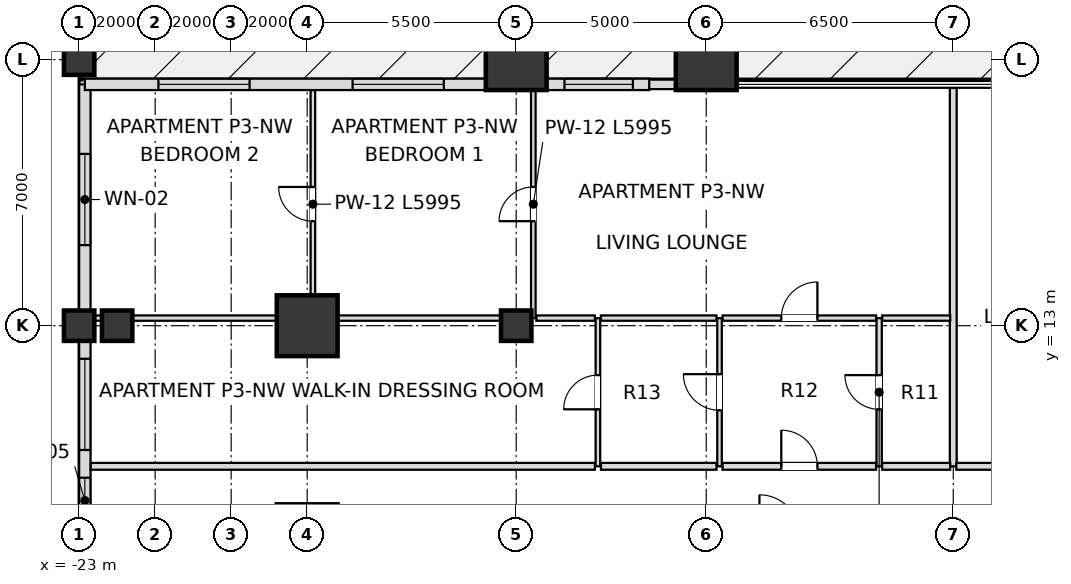
"""IFC4 building model, lengths in metres.
Left out: names, types, materials, properties, quantities, classifications, styles, units other than length and angle.
Written with IfcOpenShell. Run it as: python <this file> out.ifc"""

import sys

from ifc_helpers import new_model, si_unit, direction, frame, frame_2d, origin, origin_2d, place, context, subcontext, project, spatial, rectangle, extrude, element, fill, save


model = new_model("IFC4")
c1 = context("Model", 3, precision=1e-05, world=origin(), true_north=direction((0.0, 1.0)))
c2 = subcontext(c1, "Body", "Model", "MODEL_VIEW")
j1 = project(units=[si_unit("LENGTHUNIT", "METRE"), si_unit("PLANEANGLEUNIT", "RADIAN")], contexts=[c1])
p1 = place(None, origin())
s1 = spatial("IfcSite", under=j1, at=p1, CompositionType="ELEMENT")
p2 = place(p1, origin())
s2 = spatial("IfcBuilding", under=s1, at=p2, CompositionType="ELEMENT")
p3 = place(p2, frame((0.0, 0.0, 16.8)))
s3 = spatial("IfcBuildingStorey", under=s2, at=p3, CompositionType="ELEMENT", Elevation=16.8)
for number, where, z_axis, x_axis in (
    (1, (-6.5, 20.0, 0.0), (0.0, 0.0, 1.0), (1.0, 0.0, 0.0)),
    (2, (-11.5, 20.0, 0.0), (0.0, 0.0, 1.0), (1.0, 0.0, 0.0)),
    (3, (-17.0, 13.0, 0.0), (0.0, 0.0, 1.0), (1.0, 0.0, 0.0)),
):
    element("IfcColumn", number, at=place(p3, frame(where, z_axis=z_axis, x_axis=x_axis)), inside=s3, PredefinedType="USERDEFINED", context=c2, shape_type="SweptSolid", body=[
        extrude(rectangle(XDim=1.6, YDim=1.6, at=origin_2d()), origin(), (0.0, 0.0, 1.0), 5.4),
    ])
for number, where, z_axis, x_axis in (
    (4, (-23.0, 13.0, 0.0), (0.0, 0.0, 1.0), (1.0, 0.0, 0.0)),
    (5, (-23.0, 20.0, 0.0), (0.0, 0.0, 1.0), (1.0, 0.0, 0.0)),
    (6, (-11.5, 13.0, 0.0), (0.0, 0.0, 1.0), (1.0, 0.0, 0.0)),
    (7, (-22.0, 13.0, 0.0), (0.0, 0.0, 1.0), (1.0, 0.0, 0.0)),
):
    element("IfcColumn", number, at=place(p3, frame(where, z_axis=z_axis, x_axis=x_axis)), inside=s3, PredefinedType="COLUMN", context=c2, shape_type="SweptSolid", body=[
        extrude(rectangle(XDim=0.8, YDim=0.8, at=origin_2d()), origin(), (0.0, 0.0, 1.0), 5.4),
    ])
p4 = place(p3, frame((-22.85, 19.35, 0.0), z_axis=(0.0, 0.0, 1.0), x_axis=(0.0, -1.0, 0.0)))
e8 = element("IfcWall", 8, at=p4, inside=s3, PredefinedType="SOLIDWALL", context=c2, shape_type="SweptSolid", body=[
    extrude(rectangle(XDim=38.7, YDim=0.3, at=frame_2d((19.35, 0.0))), origin(), (0.0, 0.0, 1.0), 4.476),
])
p5 = place(p4, frame((1.83, 0.0, 0.8)))
e9 = element("IfcOpeningElement", 9, at=p5, cuts=e8, PredefinedType="OPENING", context=c2, shape_type="SweptSolid", body=[
    extrude(rectangle(XDim=2.4, YDim=2.2, at=frame_2d((1.2, 1.1))), frame((0.0, 0.16, 0.0), z_axis=(0.0, -1.0, 0.0), x_axis=(1.0, 0.0, 0.0)), (0.0, 0.0, 1.0), 0.32),
])
p6 = place(p4, frame((7.22, 0.0, 0.8)))
e10 = element("IfcOpeningElement", 10, at=p6, cuts=e8, PredefinedType="OPENING", context=c2, shape_type="SweptSolid", body=[
    extrude(rectangle(XDim=2.4, YDim=2.2, at=frame_2d((1.2, 1.1))), frame((0.0, 0.16, 0.0), z_axis=(0.0, -1.0, 0.0), x_axis=(1.0, 0.0, 0.0)), (0.0, 0.0, 1.0), 0.32),
])
p7 = place(p4, frame((10.35, 0.0, 0.72)))
e11 = element("IfcOpeningElement", 11, at=p7, cuts=e8, PredefinedType="OPENING", context=c2, shape_type="SweptSolid", body=[
    extrude(rectangle(XDim=1.2, YDim=1.68, at=frame_2d((0.6, 0.84))), frame((0.0, 0.16, 0.0), z_axis=(0.0, -1.0, 0.0), x_axis=(1.0, 0.0, 0.0)), (0.0, 0.0, 1.0), 0.32),
])
p8 = place(p4, frame((12.495, 0.0, 0.8)))
e12 = element("IfcOpeningElement", 12, at=p8, cuts=e8, PredefinedType="OPENING", context=c2, shape_type="SweptSolid", body=[
    extrude(rectangle(XDim=2.4, YDim=2.2, at=frame_2d((1.2, 1.1))), frame((0.0, 0.16, 0.0), z_axis=(0.0, -1.0, 0.0), x_axis=(1.0, 0.0, 0.0)), (0.0, 0.0, 1.0), 0.32),
])
p9 = place(p4, frame((15.865, 0.0, 0.8)))
e13 = element("IfcOpeningElement", 13, at=p9, cuts=e8, PredefinedType="OPENING", context=c2, shape_type="SweptSolid", body=[
    extrude(rectangle(XDim=2.4, YDim=2.2, at=frame_2d((1.2, 1.1))), frame((0.0, 0.16, 0.0), z_axis=(0.0, -1.0, 0.0), x_axis=(1.0, 0.0, 0.0)), (0.0, 0.0, 1.0), 0.32),
])
p10 = place(p4, frame((20.435, 0.0, 0.8)))
e14 = element("IfcOpeningElement", 14, at=p10, cuts=e8, PredefinedType="OPENING", context=c2, shape_type="SweptSolid", body=[
    extrude(rectangle(XDim=2.4, YDim=2.2, at=frame_2d((1.2, 1.1))), frame((0.0, 0.16, 0.0), z_axis=(0.0, -1.0, 0.0), x_axis=(1.0, 0.0, 0.0)), (0.0, 0.0, 1.0), 0.32),
])
p11 = place(p4, frame((23.805, 0.0, 0.8)))
e15 = element("IfcOpeningElement", 15, at=p11, cuts=e8, PredefinedType="OPENING", context=c2, shape_type="SweptSolid", body=[
    extrude(rectangle(XDim=2.4, YDim=2.2, at=frame_2d((1.2, 1.1))), frame((0.0, 0.16, 0.0), z_axis=(0.0, -1.0, 0.0), x_axis=(1.0, 0.0, 0.0)), (0.0, 0.0, 1.0), 0.32),
])
p12 = place(p4, frame((27.15, 0.0, 0.72)))
e16 = element("IfcOpeningElement", 16, at=p12, cuts=e8, PredefinedType="OPENING", context=c2, shape_type="SweptSolid", body=[
    extrude(rectangle(XDim=1.2, YDim=1.68, at=frame_2d((0.6, 0.84))), frame((0.0, 0.16, 0.0), z_axis=(0.0, -1.0, 0.0), x_axis=(1.0, 0.0, 0.0)), (0.0, 0.0, 1.0), 0.32),
])
p13 = place(p4, frame((29.08, 0.0, 0.8)))
e17 = element("IfcOpeningElement", 17, at=p13, cuts=e8, PredefinedType="OPENING", context=c2, shape_type="SweptSolid", body=[
    extrude(rectangle(XDim=2.4, YDim=2.2, at=frame_2d((1.2, 1.1))), frame((0.0, 0.16, 0.0), z_axis=(0.0, -1.0, 0.0), x_axis=(1.0, 0.0, 0.0)), (0.0, 0.0, 1.0), 0.32),
])
p14 = place(p4, frame((34.47, 0.0, 0.8)))
e18 = element("IfcOpeningElement", 18, at=p14, cuts=e8, PredefinedType="OPENING", context=c2, shape_type="SweptSolid", body=[
    extrude(rectangle(XDim=2.4, YDim=2.2, at=frame_2d((1.2, 1.1))), frame((0.0, 0.16, 0.0), z_axis=(0.0, -1.0, 0.0), x_axis=(1.0, 0.0, 0.0)), (0.0, 0.0, 1.0), 0.32),
])
p15 = place(p3, frame((-7.295, 19.35, 0.0), z_axis=(0.0, 0.0, 1.0), x_axis=(-1.0, 0.0, 0.0)))
e19 = element("IfcWall", 19, at=p15, inside=s3, PredefinedType="SOLIDWALL", context=c2, shape_type="SweptSolid", body=[
    extrude(rectangle(XDim=0.73, YDim=0.25, at=frame_2d((0.365, 0.0))), origin(), (0.0, 0.0, 1.0), 5.12),
])
p16 = place(p3, frame((-22.85, 19.35, 0.0), z_axis=(0.0, 0.0, 1.0), x_axis=(1.0, 0.0, 0.0)))
e20 = element("IfcWall", 20, at=p16, inside=s3, PredefinedType="SOLIDWALL", context=c2, shape_type="SweptSolid", body=[
    extrude(rectangle(XDim=14.85, YDim=0.3, at=frame_2d((7.425, 0.0))), origin(), (0.0, 0.0, 1.0), 5.12),
])
p17 = place(p16, frame((1.935, 0.0, 0.8)))
e21 = element("IfcOpeningElement", 21, at=p17, cuts=e20, PredefinedType="OPENING", context=c2, shape_type="SweptSolid", body=[
    extrude(rectangle(XDim=2.4, YDim=2.2, at=frame_2d((1.2, 1.1))), frame((0.0, 0.16, 0.0), z_axis=(0.0, -1.0, 0.0), x_axis=(1.0, 0.0, 0.0)), (0.0, 0.0, 1.0), 0.32),
])
p18 = place(p16, frame((7.045, 0.0, 0.8)))
e22 = element("IfcOpeningElement", 22, at=p18, cuts=e20, PredefinedType="OPENING", context=c2, shape_type="SweptSolid", body=[
    extrude(rectangle(XDim=2.4, YDim=2.2, at=frame_2d((1.2, 1.1))), frame((0.0, 0.16, 0.0), z_axis=(0.0, -1.0, 0.0), x_axis=(1.0, 0.0, 0.0)), (0.0, 0.0, 1.0), 0.32),
])
p19 = place(p16, frame((12.62, 0.0, 0.72)))
e23 = element("IfcOpeningElement", 23, at=p19, cuts=e20, PredefinedType="OPENING", context=c2, shape_type="SweptSolid", body=[
    extrude(rectangle(XDim=1.8, YDim=1.68, at=frame_2d((0.9, 0.84))), frame((0.0, 0.16, 0.0), z_axis=(0.0, -1.0, 0.0), x_axis=(1.0, 0.0, 0.0)), (0.0, 0.0, 1.0), 0.32),
])
p20 = place(p3, frame((-16.85, 13.2, 0.0), z_axis=(0.0, 0.0, 1.0), x_axis=(0.0, 1.0, 0.0)))
e24 = element("IfcWall", 24, at=p20, inside=s3, PredefinedType="PARTITIONING", context=c2, shape_type="SweptSolid", body=[
    extrude(rectangle(XDim=5.995, YDim=0.12, at=frame_2d((2.998, 0.0))), origin(), (0.0, 0.0, 1.0), 5.12),
])
p21 = place(p20, frame((2.55, 0.0, 0.0)))
e25 = element("IfcOpeningElement", 25, at=p21, cuts=e24, PredefinedType="OPENING", context=c2, shape_type="SweptSolid", body=[
    extrude(rectangle(XDim=0.9, YDim=2.1, at=frame_2d((0.45, 1.05))), frame((0.0, 0.07, 0.0), z_axis=(0.0, -1.0, 0.0), x_axis=(1.0, 0.0, 0.0)), (0.0, 0.0, 1.0), 0.14),
])
p22 = place(p3, frame((-11.05, 13.2, 0.0), z_axis=(0.0, 0.0, 1.0), x_axis=(0.0, 1.0, 0.0)))
e26 = element("IfcWall", 26, at=p22, inside=s3, PredefinedType="PARTITIONING", context=c2, shape_type="SweptSolid", body=[
    extrude(rectangle(XDim=5.995, YDim=0.12, at=frame_2d((2.998, 0.0))), origin(), (0.0, 0.0, 1.0), 5.12),
])
p23 = place(p22, frame((2.55, 0.0, 0.0)))
e27 = element("IfcOpeningElement", 27, at=p23, cuts=e26, PredefinedType="OPENING", context=c2, shape_type="SweptSolid", body=[
    extrude(rectangle(XDim=0.9, YDim=2.1, at=frame_2d((0.45, 1.05))), frame((0.0, 0.07, 0.0), z_axis=(0.0, -1.0, 0.0), x_axis=(1.0, 0.0, 0.0)), (0.0, 0.0, 1.0), 0.14),
])
p24 = place(p3, frame((-9.35, 9.3, 0.0), z_axis=(0.0, 0.0, 1.0), x_axis=(0.0, 1.0, 0.0)))
e28 = element("IfcWall", 28, at=p24, inside=s3, PredefinedType="PARTITIONING", context=c2, shape_type="SweptSolid", body=[
    extrude(rectangle(XDim=3.9, YDim=0.12, at=frame_2d((1.95, 0.0))), origin(), (0.0, 0.0, 1.0), 4.41),
])
p25 = place(p24, frame((1.5, 0.0, 0.0)))
e29 = element("IfcOpeningElement", 29, at=p25, cuts=e28, PredefinedType="OPENING", context=c2, shape_type="SweptSolid", body=[
    extrude(rectangle(XDim=0.9, YDim=2.1, at=frame_2d((0.45, 1.05))), frame((0.0, 0.07, 0.0), z_axis=(0.0, -1.0, 0.0), x_axis=(1.0, 0.0, 0.0)), (0.0, 0.0, 1.0), 0.14),
])
p26 = place(p3, frame((-6.15, 9.3, 0.0), z_axis=(0.0, 0.0, 1.0), x_axis=(0.0, 1.0, 0.0)))
e30 = element("IfcWall", 30, at=p26, inside=s3, PredefinedType="PARTITIONING", context=c2, shape_type="SweptSolid", body=[
    extrude(rectangle(XDim=3.9, YDim=0.12, at=frame_2d((1.95, 0.0))), origin(), (0.0, 0.0, 1.0), 5.12),
])
p27 = place(p26, frame((1.475, 0.0, 0.0)))
e31 = element("IfcOpeningElement", 31, at=p27, cuts=e30, PredefinedType="OPENING", context=c2, shape_type="SweptSolid", body=[
    extrude(rectangle(XDim=0.95, YDim=2.1, at=frame_2d((0.475, 1.05))), frame((0.0, 0.07, 0.0), z_axis=(0.0, -1.0, 0.0), x_axis=(1.0, 0.0, 0.0)), (0.0, 0.0, 1.0), 0.14),
])
p28 = place(p3, frame((-1.95, 9.3, 0.0), z_axis=(0.0, 0.0, 1.0), x_axis=(0.0, 1.0, 0.0)))
e32 = element("IfcWall", 32, at=p28, inside=s3, PredefinedType="PARTITIONING", context=c2, shape_type="SweptSolid", body=[
    extrude(rectangle(XDim=3.9, YDim=0.14, at=frame_2d((1.95, 0.0))), origin(), (0.0, 0.0, 1.0), 5.12),
])
p29 = place(p28, frame((1.5, 0.0, 0.0)))
e33 = element("IfcOpeningElement", 33, at=p29, cuts=e32, PredefinedType="OPENING", context=c2, shape_type="SweptSolid", body=[
    extrude(rectangle(XDim=0.9, YDim=2.1, at=frame_2d((0.45, 1.05))), frame((0.0, 0.08, 0.0), z_axis=(0.0, -1.0, 0.0), x_axis=(1.0, 0.0, 0.0)), (0.0, 0.0, 1.0), 0.16),
])
p30 = place(p3, frame((0.0, 9.3, 0.0), z_axis=(0.0, 0.0, 1.0), x_axis=(0.0, 1.0, 0.0)))
e34 = element("IfcWall", 34, at=p30, inside=s3, PredefinedType="PARTITIONING", context=c2, shape_type="SweptSolid", body=[
    extrude(rectangle(XDim=9.955, YDim=0.18, at=frame_2d((4.978, 0.0))), origin(), (0.0, 0.0, 1.0), 4.642),
])
p31 = place(p3, frame((-22.695, 9.3, 0.0), z_axis=(0.0, 0.0, 1.0), x_axis=(1.0, 0.0, 0.0)))
e35 = element("IfcWall", 35, at=p31, inside=s3, PredefinedType="PARTITIONING", context=c2, shape_type="SweptSolid", body=[
    extrude(rectangle(XDim=13.265, YDim=0.18, at=frame_2d((6.633, 0.0))), origin(), (0.0, 0.0, 1.0), 4.41),
])
p32 = place(p3, frame((-9.27, 9.3, 0.0), z_axis=(0.0, 0.0, 1.0), x_axis=(1.0, 0.0, 0.0)))
e36 = element("IfcWall", 36, at=p32, inside=s3, PredefinedType="PARTITIONING", context=c2, shape_type="SweptSolid", body=[
    extrude(rectangle(XDim=3.04, YDim=0.18, at=frame_2d((1.52, 0.0))), origin(), (0.0, 0.0, 1.0), 4.41),
])
p33 = place(p3, frame((-6.07, 9.3, 0.0), z_axis=(0.0, 0.0, 1.0), x_axis=(1.0, 0.0, 0.0)))
e37 = element("IfcWall", 37, at=p33, inside=s3, PredefinedType="PARTITIONING", context=c2, shape_type="SweptSolid", body=[
    extrude(rectangle(XDim=4.04, YDim=0.18, at=frame_2d((2.02, 0.0))), origin(), (0.0, 0.0, 1.0), 5.12),
])
p34 = place(p33, frame((1.545, 0.0, 0.0)))
e38 = element("IfcOpeningElement", 38, at=p34, cuts=e37, PredefinedType="OPENING", context=c2, shape_type="SweptSolid", body=[
    extrude(rectangle(XDim=0.95, YDim=2.15, at=frame_2d((0.475, 1.075))), frame((0.0, 0.1, 0.0), z_axis=(0.0, -1.0, 0.0), x_axis=(1.0, 0.0, 0.0)), (0.0, 0.0, 1.0), 0.2),
])
p35 = place(p3, frame((-1.87, 9.3, 0.0), z_axis=(0.0, 0.0, 1.0), x_axis=(1.0, 0.0, 0.0)))
e39 = element("IfcWall", 39, at=p35, inside=s3, PredefinedType="PARTITIONING", context=c2, shape_type="SweptSolid", body=[
    extrude(rectangle(XDim=1.79, YDim=0.18, at=frame_2d((0.895, 0.0))), origin(), (0.0, 0.0, 1.0), 5.12),
])
p36 = place(p3, frame((0.08, 9.3, 0.0), z_axis=(0.0, 0.0, 1.0), x_axis=(1.0, 0.0, 0.0)))
e40 = element("IfcWall", 40, at=p36, inside=s3, PredefinedType="PARTITIONING", context=c2, shape_type="SweptSolid", body=[
    extrude(rectangle(XDim=22.615, YDim=0.18, at=frame_2d((11.308, 0.0))), origin(), (0.0, 0.0, 1.0), 4.41),
])
p37 = place(p36, frame((9.445, 0.0, 0.0)))
e41 = element("IfcOpeningElement", 41, at=p37, cuts=e40, PredefinedType="OPENING", context=c2, shape_type="SweptSolid", body=[
    extrude(rectangle(XDim=0.95, YDim=2.15, at=frame_2d((0.475, 1.075))), frame((0.0, 0.1, 0.0), z_axis=(0.0, -1.0, 0.0), x_axis=(1.0, 0.0, 0.0)), (0.0, 0.0, 1.0), 0.2),
])
p38 = place(p3, frame((-22.695, 13.2, 0.0), z_axis=(0.0, 0.0, 1.0), x_axis=(1.0, 0.0, 0.0)))
e42 = element("IfcWall", 42, at=p38, inside=s3, PredefinedType="PARTITIONING", context=c2, shape_type="SweptSolid", body=[
    extrude(rectangle(XDim=5.765, YDim=0.14, at=frame_2d((2.883, 0.0))), origin(), (0.0, 0.0, 1.0), 4.41),
])
p39 = place(p3, frame((-16.77, 13.2, 0.0), z_axis=(0.0, 0.0, 1.0), x_axis=(1.0, 0.0, 0.0)))
e43 = element("IfcWall", 43, at=p39, inside=s3, PredefinedType="PARTITIONING", context=c2, shape_type="SweptSolid", body=[
    extrude(rectangle(XDim=5.64, YDim=0.14, at=frame_2d((2.82, 0.0))), origin(), (0.0, 0.0, 1.0), 4.41),
])
p40 = place(p3, frame((-10.97, 13.2, 0.0), z_axis=(0.0, 0.0, 1.0), x_axis=(1.0, 0.0, 0.0)))
e44 = element("IfcWall", 44, at=p40, inside=s3, PredefinedType="PARTITIONING", context=c2, shape_type="SweptSolid", body=[
    extrude(rectangle(XDim=1.54, YDim=0.14, at=frame_2d((0.77, 0.0))), origin(), (0.0, 0.0, 1.0), 4.41),
])
p41 = place(p3, frame((-9.27, 13.2, 0.0), z_axis=(0.0, 0.0, 1.0), x_axis=(1.0, 0.0, 0.0)))
e45 = element("IfcWall", 45, at=p41, inside=s3, PredefinedType="PARTITIONING", context=c2, shape_type="SweptSolid", body=[
    extrude(rectangle(XDim=3.04, YDim=0.14, at=frame_2d((1.52, 0.0))), origin(), (0.0, 0.0, 1.0), 4.41),
])
p42 = place(p3, frame((-6.07, 13.2, 0.0), z_axis=(0.0, 0.0, 1.0), x_axis=(1.0, 0.0, 0.0)))
e46 = element("IfcWall", 46, at=p42, inside=s3, PredefinedType="PARTITIONING", context=c2, shape_type="SweptSolid", body=[
    extrude(rectangle(XDim=4.04, YDim=0.14, at=frame_2d((2.02, 0.0))), origin(), (0.0, 0.0, 1.0), 5.12),
])
p43 = place(p42, frame((1.545, 0.0, 0.0)))
e47 = element("IfcOpeningElement", 47, at=p43, cuts=e46, PredefinedType="OPENING", context=c2, shape_type="SweptSolid", body=[
    extrude(rectangle(XDim=0.95, YDim=2.1, at=frame_2d((0.475, 1.05))), frame((0.0, 0.08, 0.0), z_axis=(0.0, -1.0, 0.0), x_axis=(1.0, 0.0, 0.0)), (0.0, 0.0, 1.0), 0.16),
])
p44 = place(p3, frame((-1.87, 13.2, 0.0), z_axis=(0.0, 0.0, 1.0), x_axis=(1.0, 0.0, 0.0)))
e48 = element("IfcWall", 48, at=p44, inside=s3, PredefinedType="PARTITIONING", context=c2, shape_type="SweptSolid", body=[
    extrude(rectangle(XDim=1.79, YDim=0.14, at=frame_2d((0.895, 0.0))), origin(), (0.0, 0.0, 1.0), 5.12),
])
p45 = place(p5, origin())
e49 = element("IfcWindow", 49, at=p45, inside=s3, PartitioningType="SINGLE_PANEL", PredefinedType="WINDOW", context=c2, shape_type="SweptSolid", body=[
    extrude(rectangle(XDim=2.4, YDim=2.2, at=frame_2d((1.2, 1.1))), frame((0.0, 0.03, 0.0), z_axis=(0.0, -1.0, 0.0), x_axis=(1.0, 0.0, 0.0)), (0.0, 0.0, 1.0), 0.06),
])
fill(e9, e49)
p46 = place(p6, origin())
e50 = element("IfcWindow", 50, at=p46, inside=s3, PartitioningType="SINGLE_PANEL", PredefinedType="WINDOW", context=c2, shape_type="SweptSolid", body=[
    extrude(rectangle(XDim=2.4, YDim=2.2, at=frame_2d((1.2, 1.1))), frame((0.0, 0.03, 0.0), z_axis=(0.0, -1.0, 0.0), x_axis=(1.0, 0.0, 0.0)), (0.0, 0.0, 1.0), 0.06),
])
fill(e10, e50)
p47 = place(p7, origin())
e51 = element("IfcWindow", 51, at=p47, inside=s3, PartitioningType="SINGLE_PANEL", PredefinedType="WINDOW", context=c2, shape_type="SweptSolid", body=[
    extrude(rectangle(XDim=1.2, YDim=1.68, at=frame_2d((0.6, 0.84))), frame((0.0, 0.03, 0.0), z_axis=(0.0, -1.0, 0.0), x_axis=(1.0, 0.0, 0.0)), (0.0, 0.0, 1.0), 0.06),
])
fill(e11, e51)
p48 = place(p17, origin())
e52 = element("IfcWindow", 52, at=p48, inside=s3, PartitioningType="SINGLE_PANEL", PredefinedType="WINDOW", context=c2, shape_type="SweptSolid", body=[
    extrude(rectangle(XDim=2.4, YDim=2.2, at=frame_2d((1.2, 1.1))), frame((0.0, 0.03, 0.0), z_axis=(0.0, -1.0, 0.0), x_axis=(1.0, 0.0, 0.0)), (0.0, 0.0, 1.0), 0.06),
])
fill(e21, e52)
p49 = place(p18, origin())
e53 = element("IfcWindow", 53, at=p49, inside=s3, PartitioningType="SINGLE_PANEL", PredefinedType="WINDOW", context=c2, shape_type="SweptSolid", body=[
    extrude(rectangle(XDim=2.4, YDim=2.2, at=frame_2d((1.2, 1.1))), frame((0.0, 0.03, 0.0), z_axis=(0.0, -1.0, 0.0), x_axis=(1.0, 0.0, 0.0)), (0.0, 0.0, 1.0), 0.06),
])
fill(e22, e53)
p50 = place(p19, origin())
e54 = element("IfcWindow", 54, at=p50, inside=s3, PartitioningType="SINGLE_PANEL", PredefinedType="WINDOW", context=c2, shape_type="SweptSolid", body=[
    extrude(rectangle(XDim=1.8, YDim=1.68, at=frame_2d((0.9, 0.84))), frame((0.0, 0.03, 0.0), z_axis=(0.0, -1.0, 0.0), x_axis=(1.0, 0.0, 0.0)), (0.0, 0.0, 1.0), 0.06),
])
fill(e23, e54)
p51 = place(p29, origin())
e55 = element("IfcDoor", 55, at=p51, inside=s3, OperationType="SINGLE_SWING_RIGHT", PredefinedType="DOOR", context=c2, shape_type="SweptSolid", body=[
    extrude(rectangle(XDim=0.9, YDim=2.1, at=frame_2d((0.45, 1.05))), frame((0.0, 0.025, 0.0), z_axis=(0.0, -1.0, 0.0), x_axis=(1.0, 0.0, 0.0)), (0.0, 0.0, 1.0), 0.05),
])
fill(e33, e55)
p52 = place(p34, origin())
e56 = element("IfcDoor", 56, at=p52, inside=s3, OperationType="SINGLE_SWING_LEFT", PredefinedType="DOOR", context=c2, shape_type="SweptSolid", body=[
    extrude(rectangle(XDim=0.95, YDim=2.15, at=frame_2d((0.475, 1.075))), frame((0.0, 0.025, 0.0), z_axis=(0.0, -1.0, 0.0), x_axis=(1.0, 0.0, 0.0)), (0.0, 0.0, 1.0), 0.05),
])
fill(e38, e56)
p53 = place(p27, origin())
e57 = element("IfcDoor", 57, at=p53, inside=s3, OperationType="SINGLE_SWING_RIGHT", PredefinedType="DOOR", context=c2, shape_type="SweptSolid", body=[
    extrude(rectangle(XDim=0.95, YDim=2.1, at=frame_2d((0.475, 1.05))), frame((0.0, 0.025, 0.0), z_axis=(0.0, -1.0, 0.0), x_axis=(1.0, 0.0, 0.0)), (0.0, 0.0, 1.0), 0.05),
])
fill(e31, e57)
p54 = place(p25, origin())
e58 = element("IfcDoor", 58, at=p54, inside=s3, OperationType="SINGLE_SWING_LEFT", PredefinedType="DOOR", context=c2, shape_type="SweptSolid", body=[
    extrude(rectangle(XDim=0.9, YDim=2.1, at=frame_2d((0.45, 1.05))), frame((0.0, 0.025, 0.0), z_axis=(0.0, -1.0, 0.0), x_axis=(1.0, 0.0, 0.0)), (0.0, 0.0, 1.0), 0.05),
])
fill(e29, e58)
p55 = place(p43, origin())
e59 = element("IfcDoor", 59, at=p55, inside=s3, OperationType="SINGLE_SWING_RIGHT", PredefinedType="DOOR", context=c2, shape_type="SweptSolid", body=[
    extrude(rectangle(XDim=0.95, YDim=2.1, at=frame_2d((0.475, 1.05))), frame((0.0, 0.025, 0.0), z_axis=(0.0, -1.0, 0.0), x_axis=(1.0, 0.0, 0.0)), (0.0, 0.0, 1.0), 0.05),
])
fill(e47, e59)
p56 = place(p23, origin())
e60 = element("IfcDoor", 60, at=p56, inside=s3, OperationType="SINGLE_SWING_LEFT", PredefinedType="DOOR", context=c2, shape_type="SweptSolid", body=[
    extrude(rectangle(XDim=0.9, YDim=2.1, at=frame_2d((0.45, 1.05))), frame((0.0, 0.025, 0.0), z_axis=(0.0, -1.0, 0.0), x_axis=(1.0, 0.0, 0.0)), (0.0, 0.0, 1.0), 0.05),
])
fill(e27, e60)
p57 = place(p21, origin())
e61 = element("IfcDoor", 61, at=p57, inside=s3, OperationType="SINGLE_SWING_RIGHT", PredefinedType="DOOR", context=c2, shape_type="SweptSolid", body=[
    extrude(rectangle(XDim=0.9, YDim=2.1, at=frame_2d((0.45, 1.05))), frame((0.0, 0.025, 0.0), z_axis=(0.0, -1.0, 0.0), x_axis=(1.0, 0.0, 0.0)), (0.0, 0.0, 1.0), 0.05),
])
fill(e25, e61)
save(model, sys.argv[1])
